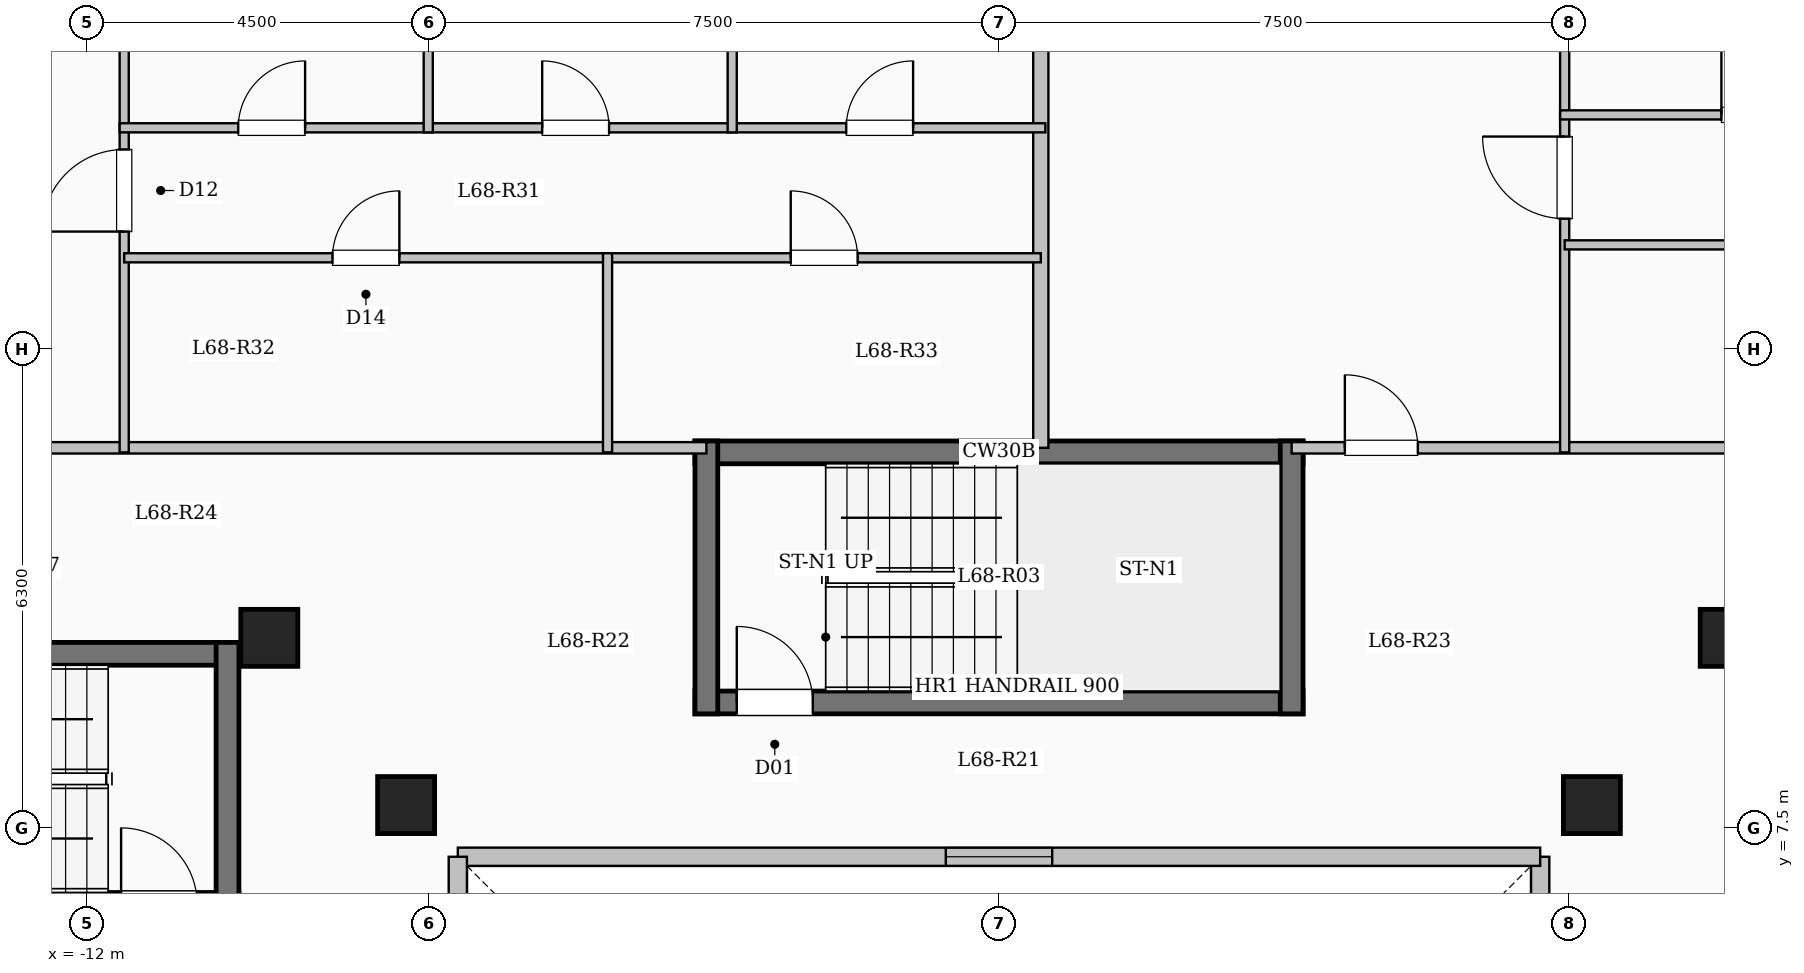
"""IFC4 building model, lengths in metres.
Left out: names, types, materials, properties, quantities, classifications, styles, units other than length and angle.
Written with IfcOpenShell. Run it as: python <this file> out.ifc"""

import sys

from ifc_helpers import new_model, si_unit, direction, frame, frame_2d, origin, origin_2d, place, context, subcontext, project, spatial, rectangle, extrude, element, fill, save


model = new_model("IFC4")
c1 = context("Model", 3, precision=1e-05, world=origin(), true_north=direction((0.0, 1.0)))
c2 = subcontext(c1, "Body", "Model", "MODEL_VIEW")
j1 = project(units=[si_unit("LENGTHUNIT", "METRE"), si_unit("PLANEANGLEUNIT", "RADIAN")], contexts=[c1])
p1 = place(None, origin())
s1 = spatial("IfcSite", under=j1, at=p1, CompositionType="ELEMENT")
p2 = place(p1, origin())
s2 = spatial("IfcBuilding", under=s1, at=p2, CompositionType="ELEMENT")
p3 = place(p2, frame((0.0, 0.0, 251.55)))
s3 = spatial("IfcBuildingStorey", under=s2, at=p3, CompositionType="ELEMENT", Elevation=251.55)
for number, where, z_axis, x_axis in (
    (1, (-7.8, 7.8, 0.0), (0.0, 0.0, 1.0), (1.0, 0.0, 0.0)),
    (2, (7.8, 7.8, 0.0), (0.0, 0.0, 1.0), (1.0, 0.0, 0.0)),
    (3, (-9.6, 10.0, 0.0), (0.0, 0.0, 1.0), (1.0, 0.0, 0.0)),
    (4, (9.6, 10.0, 0.0), (0.0, 0.0, 1.0), (1.0, 0.0, 0.0)),
):
    element("IfcColumn", number, at=place(p3, frame(where, z_axis=z_axis, x_axis=x_axis)), inside=s3, PredefinedType="COLUMN", context=c2, shape_type="SweptSolid", body=[
        extrude(rectangle(XDim=0.75, YDim=0.75, at=origin_2d()), origin(), (0.0, 0.0, 1.0), 3.35),
    ])
p4 = place(p3, frame((7.12, -7.12, 0.0), z_axis=(0.0, 0.0, 1.0), x_axis=(0.0, 1.0, 0.0)))
e5 = element("IfcWall", 5, at=p4, inside=s3, PredefinedType="SOLIDWALL", context=c2, shape_type="SweptSolid", body=[
    extrude(rectangle(XDim=14.24, YDim=0.24, at=frame_2d((7.12, 0.0))), origin(), (0.0, 0.0, 1.0), 3.1),
])
p5 = place(p4, frame((6.42, 0.0, 0.95)))
e6 = element("IfcOpeningElement", 6, at=p5, cuts=e5, PredefinedType="OPENING", context=c2, shape_type="SweptSolid", body=[
    extrude(rectangle(XDim=1.4, YDim=1.5, at=frame_2d((0.7, 0.75))), frame((0.0, 0.13, 0.0), z_axis=(0.0, -1.0, 0.0), x_axis=(1.0, 0.0, 0.0)), (0.0, 0.0, 1.0), 0.26),
])
p6 = place(p3, frame((7.12, 7.12, 0.0), z_axis=(0.0, 0.0, 1.0), x_axis=(-1.0, 0.0, 0.0)))
e7 = element("IfcWall", 7, at=p6, inside=s3, PredefinedType="SOLIDWALL", context=c2, shape_type="SweptSolid", body=[
    extrude(rectangle(XDim=14.24, YDim=0.24, at=frame_2d((7.12, 0.0))), origin(), (0.0, 0.0, 1.0), 3.1),
])
p7 = place(p6, frame((6.42, 0.0, 0.95)))
e8 = element("IfcOpeningElement", 8, at=p7, cuts=e7, PredefinedType="OPENING", context=c2, shape_type="SweptSolid", body=[
    extrude(rectangle(XDim=1.4, YDim=1.5, at=frame_2d((0.7, 0.75))), frame((0.0, 0.13, 0.0), z_axis=(0.0, -1.0, 0.0), x_axis=(1.0, 0.0, 0.0)), (0.0, 0.0, 1.0), 0.26),
])
p8 = place(p3, frame((-7.12, 7.12, 0.0), z_axis=(0.0, 0.0, 1.0), x_axis=(0.0, -1.0, 0.0)))
e9 = element("IfcWall", 9, at=p8, inside=s3, PredefinedType="SOLIDWALL", context=c2, shape_type="SweptSolid", body=[
    extrude(rectangle(XDim=14.24, YDim=0.24, at=frame_2d((7.12, 0.0))), origin(), (0.0, 0.0, 1.0), 3.1),
])
p9 = place(p8, frame((6.42, 0.0, 0.95)))
e10 = element("IfcOpeningElement", 10, at=p9, cuts=e9, PredefinedType="OPENING", context=c2, shape_type="SweptSolid", body=[
    extrude(rectangle(XDim=1.4, YDim=1.5, at=frame_2d((0.7, 0.75))), frame((0.0, 0.13, 0.0), z_axis=(0.0, -1.0, 0.0), x_axis=(1.0, 0.0, 0.0)), (0.0, 0.0, 1.0), 0.26),
])
p10 = place(p3, frame((-18.0, 9.79, 0.0), z_axis=(0.0, 0.0, 1.0), x_axis=(1.0, 0.0, 0.0)))
e11 = element("IfcWall", 11, at=p10, inside=s3, PredefinedType="SHEAR", context=c2, shape_type="SweptSolid", body=[
    extrude(rectangle(XDim=8.0, YDim=0.3, at=frame_2d((4.0, 0.0))), origin(), (0.0, 0.0, 1.0), 3.35),
])
p11 = place(p3, frame((-18.0, 6.5, 0.0), z_axis=(0.0, 0.0, 1.0), x_axis=(1.0, 0.0, 0.0)))
e12 = element("IfcWall", 12, at=p11, inside=s3, PredefinedType="SHEAR", context=c2, shape_type="SweptSolid", body=[
    extrude(rectangle(XDim=8.0, YDim=0.3, at=frame_2d((4.0, 0.0))), origin(), (0.0, 0.0, 1.0), 3.35),
])
p12 = place(p11, frame((6.45, 0.0, 0.0)))
e13 = element("IfcOpeningElement", 13, at=p12, cuts=e12, PredefinedType="OPENING", context=c2, shape_type="SweptSolid", body=[
    extrude(rectangle(XDim=1.0, YDim=2.15, at=frame_2d((0.5, 1.075))), frame((0.0, 0.16, 0.0), z_axis=(0.0, -1.0, 0.0), x_axis=(1.0, 0.0, 0.0)), (0.0, 0.0, 1.0), 0.32),
])
p13 = place(p3, frame((-10.15, 6.35, 0.0), z_axis=(0.0, 0.0, 1.0), x_axis=(0.0, 1.0, 0.0)))
e14 = element("IfcWall", 14, at=p13, inside=s3, PredefinedType="SHEAR", context=c2, shape_type="SweptSolid", body=[
    extrude(rectangle(XDim=3.59, YDim=0.3, at=frame_2d((1.795, 0.0))), origin(), (0.0, 0.0, 1.0), 3.35),
])
p14 = place(p3, frame((-4.0, 12.44, 0.0), z_axis=(0.0, 0.0, 1.0), x_axis=(1.0, 0.0, 0.0)))
e15 = element("IfcWall", 15, at=p14, inside=s3, PredefinedType="SHEAR", context=c2, shape_type="SweptSolid", body=[
    extrude(rectangle(XDim=8.0, YDim=0.3, at=frame_2d((4.0, 0.0))), origin(), (0.0, 0.0, 1.0), 3.35),
])
p15 = place(p3, frame((-4.0, 9.15, 0.0), z_axis=(0.0, 0.0, 1.0), x_axis=(1.0, 0.0, 0.0)))
e16 = element("IfcWall", 16, at=p15, inside=s3, PredefinedType="SHEAR", context=c2, shape_type="SweptSolid", body=[
    extrude(rectangle(XDim=8.0, YDim=0.3, at=frame_2d((4.0, 0.0))), origin(), (0.0, 0.0, 1.0), 3.35),
])
p16 = place(p15, frame((0.55, 0.0, 0.0)))
e17 = element("IfcOpeningElement", 17, at=p16, cuts=e16, PredefinedType="OPENING", context=c2, shape_type="SweptSolid", body=[
    extrude(rectangle(XDim=1.0, YDim=2.15, at=frame_2d((0.5, 1.075))), frame((0.0, 0.16, 0.0), z_axis=(0.0, -1.0, 0.0), x_axis=(1.0, 0.0, 0.0)), (0.0, 0.0, 1.0), 0.32),
])
for number, where, z_axis, x_axis in (
    (18, (-3.85, 9.0, 0.0), (0.0, 0.0, 1.0), (0.0, 1.0, 0.0)),
    (19, (3.85, 9.0, 0.0), (0.0, 0.0, 1.0), (0.0, 1.0, 0.0)),
):
    element("IfcWall", number, at=place(p3, frame(where, z_axis=z_axis, x_axis=x_axis)), inside=s3, PredefinedType="SHEAR", context=c2, shape_type="SweptSolid", body=[
        extrude(rectangle(XDim=3.59, YDim=0.3, at=frame_2d((1.795, 0.0))), origin(), (0.0, 0.0, 1.0), 3.35),
    ])
p17 = place(p3, frame((-17.75, 12.5, 0.0), z_axis=(0.0, 0.0, 1.0), x_axis=(1.0, 0.0, 0.0)))
e20 = element("IfcWall", 20, at=p17, inside=s3, PredefinedType="PARTITIONING", context=c2, shape_type="SweptSolid", body=[
    extrude(rectangle(XDim=13.9, YDim=0.15, at=frame_2d((6.95, 0.0))), origin(), (0.0, 0.0, 1.0), 3.1),
])
p18 = place(p17, frame((0.7, 0.0, 0.0)))
e21 = element("IfcOpeningElement", 21, at=p18, cuts=e20, PredefinedType="OPENING", context=c2, shape_type="SweptSolid", body=[
    extrude(rectangle(XDim=0.96, YDim=2.15, at=frame_2d((0.48, 1.075))), frame((0.0, 0.085, 0.0), z_axis=(0.0, -1.0, 0.0), x_axis=(1.0, 0.0, 0.0)), (0.0, 0.0, 1.0), 0.17),
])
p19 = place(p3, frame((3.85, 12.5, 0.0), z_axis=(0.0, 0.0, 1.0), x_axis=(1.0, 0.0, 0.0)))
e22 = element("IfcWall", 22, at=p19, inside=s3, PredefinedType="PARTITIONING", context=c2, shape_type="SweptSolid", body=[
    extrude(rectangle(XDim=13.9, YDim=0.15, at=frame_2d((6.95, 0.0))), origin(), (0.0, 0.0, 1.0), 3.1),
])
p20 = place(p19, frame((0.7, 0.0, 0.0)))
e23 = element("IfcOpeningElement", 23, at=p20, cuts=e22, PredefinedType="OPENING", context=c2, shape_type="SweptSolid", body=[
    extrude(rectangle(XDim=0.96, YDim=2.15, at=frame_2d((0.48, 1.075))), frame((0.0, 0.085, 0.0), z_axis=(0.0, -1.0, 0.0), x_axis=(1.0, 0.0, 0.0)), (0.0, 0.0, 1.0), 0.17),
])
p21 = place(p3, frame((0.55, 12.5, 0.0), z_axis=(0.0, 0.0, 1.0), x_axis=(0.0, 1.0, 0.0)))
e24 = element("IfcWall", 24, at=p21, inside=s3, PredefinedType="SOLIDWALL", context=c2, shape_type="SweptSolid", body=[
    extrude(rectangle(XDim=9.88, YDim=0.2, at=frame_2d((4.94, 0.0))), origin(), (0.0, 0.0, 1.0), 3.1),
])
p22 = place(p3, frame((-11.509, 12.44, 0.0), z_axis=(0.0, 0.0, 1.0), x_axis=(0.0, 1.0, 0.0)))
e25 = element("IfcWall", 25, at=p22, inside=s3, PredefinedType="PARTITIONING", context=c2, shape_type="SweptSolid", body=[
    extrude(rectangle(XDim=8.46, YDim=0.12, at=frame_2d((4.23, 0.0))), origin(), (0.0, 0.0, 1.0), 3.1),
])
p23 = place(p22, frame((2.905, 0.0, 0.0)))
e26 = element("IfcOpeningElement", 26, at=p23, cuts=e25, PredefinedType="OPENING", context=c2, shape_type="SweptSolid", body=[
    extrude(rectangle(XDim=1.08, YDim=2.15, at=frame_2d((0.54, 1.075))), frame((0.0, 0.07, 0.0), z_axis=(0.0, -1.0, 0.0), x_axis=(1.0, 0.0, 0.0)), (0.0, 0.0, 1.0), 0.14),
])
p24 = place(p3, frame((-11.509, 15.0, 0.0), z_axis=(0.0, 0.0, 1.0), x_axis=(1.0, 0.0, 0.0)))
e27 = element("IfcWall", 27, at=p24, inside=s3, PredefinedType="PARTITIONING", context=c2, shape_type="SweptSolid", body=[
    extrude(rectangle(XDim=6.359, YDim=0.12, at=frame_2d((3.18, 0.0))), origin(), (0.0, 0.0, 1.0), 3.1),
])
p25 = place(p24, frame((2.74, 0.0, 0.0)))
e28 = element("IfcOpeningElement", 28, at=p25, cuts=e27, PredefinedType="OPENING", context=c2, shape_type="SweptSolid", body=[
    extrude(rectangle(XDim=0.88, YDim=2.1, at=frame_2d((0.44, 1.05))), frame((0.0, 0.07, 0.0), z_axis=(0.0, -1.0, 0.0), x_axis=(1.0, 0.0, 0.0)), (0.0, 0.0, 1.0), 0.14),
])
p26 = place(p3, frame((-5.15, 15.0, 0.0), z_axis=(0.0, 0.0, 1.0), x_axis=(1.0, 0.0, 0.0)))
e29 = element("IfcWall", 29, at=p26, inside=s3, PredefinedType="PARTITIONING", context=c2, shape_type="SweptSolid", body=[
    extrude(rectangle(XDim=5.7, YDim=0.12, at=frame_2d((2.85, 0.0))), origin(), (0.0, 0.0, 1.0), 3.1),
])
p27 = place(p26, frame((2.41, 0.0, 0.0)))
e30 = element("IfcOpeningElement", 30, at=p27, cuts=e29, PredefinedType="OPENING", context=c2, shape_type="SweptSolid", body=[
    extrude(rectangle(XDim=0.88, YDim=2.1, at=frame_2d((0.44, 1.05))), frame((0.0, 0.07, 0.0), z_axis=(0.0, -1.0, 0.0), x_axis=(1.0, 0.0, 0.0)), (0.0, 0.0, 1.0), 0.14),
])
p28 = place(p3, frame((-11.569, 16.71, 0.0), z_axis=(0.0, 0.0, 1.0), x_axis=(1.0, 0.0, 0.0)))
e31 = element("IfcWall", 31, at=p28, inside=s3, PredefinedType="PARTITIONING", context=c2, shape_type="SweptSolid", body=[
    extrude(rectangle(XDim=12.179, YDim=0.12, at=frame_2d((6.09, 0.0))), origin(), (0.0, 0.0, 1.0), 2.785),
])
p29 = place(p28, frame((1.56, 0.0, 0.0)))
e32 = element("IfcOpeningElement", 32, at=p29, cuts=e31, PredefinedType="OPENING", context=c2, shape_type="SweptSolid", body=[
    extrude(rectangle(XDim=0.88, YDim=2.1, at=frame_2d((0.44, 1.05))), frame((0.0, 0.07, 0.0), z_axis=(0.0, -1.0, 0.0), x_axis=(1.0, 0.0, 0.0)), (0.0, 0.0, 1.0), 0.14),
])
p30 = place(p28, frame((5.559, 0.0, 0.0)))
e33 = element("IfcOpeningElement", 33, at=p30, cuts=e31, PredefinedType="OPENING", context=c2, shape_type="SweptSolid", body=[
    extrude(rectangle(XDim=0.88, YDim=2.1, at=frame_2d((0.44, 1.05))), frame((0.0, 0.07, 0.0), z_axis=(0.0, -1.0, 0.0), x_axis=(1.0, 0.0, 0.0)), (0.0, 0.0, 1.0), 0.14),
])
p31 = place(p28, frame((9.559, 0.0, 0.0)))
e34 = element("IfcOpeningElement", 34, at=p31, cuts=e31, PredefinedType="OPENING", context=c2, shape_type="SweptSolid", body=[
    extrude(rectangle(XDim=0.88, YDim=2.1, at=frame_2d((0.44, 1.05))), frame((0.0, 0.07, 0.0), z_axis=(0.0, -1.0, 0.0), x_axis=(1.0, 0.0, 0.0)), (0.0, 0.0, 1.0), 0.14),
])
p32 = place(p3, frame((-5.15, 12.44, 0.0), z_axis=(0.0, 0.0, 1.0), x_axis=(0.0, 1.0, 0.0)))
e35 = element("IfcWall", 35, at=p32, inside=s3, PredefinedType="PARTITIONING", context=c2, shape_type="SweptSolid", body=[
    extrude(rectangle(XDim=2.62, YDim=0.12, at=frame_2d((1.31, 0.0))), origin(), (0.0, 0.0, 1.0), 3.1),
])
p33 = place(p3, frame((-7.509, 16.65, 0.0), z_axis=(0.0, 0.0, 1.0), x_axis=(0.0, 1.0, 0.0)))
e36 = element("IfcWall", 36, at=p33, inside=s3, PredefinedType="PARTITIONING", context=c2, shape_type="SweptSolid", body=[
    extrude(rectangle(XDim=5.111, YDim=0.12, at=frame_2d((2.556, 0.0))), origin(), (0.0, 0.0, 1.0), 2.685),
])
p34 = place(p3, frame((-3.51, 16.65, 0.0), z_axis=(0.0, 0.0, 1.0), x_axis=(0.0, 1.0, 0.0)))
e37 = element("IfcWall", 37, at=p34, inside=s3, PredefinedType="PARTITIONING", context=c2, shape_type="SweptSolid", body=[
    extrude(rectangle(XDim=5.73, YDim=0.12, at=frame_2d((2.865, 0.0))), origin(), (0.0, 0.0, 1.0), 3.1),
])
p35 = place(p3, frame((7.442, 12.44, 0.0), z_axis=(0.0, 0.0, 1.0), x_axis=(0.0, 1.0, 0.0)))
e38 = element("IfcWall", 38, at=p35, inside=s3, PredefinedType="PARTITIONING", context=c2, shape_type="SweptSolid", body=[
    extrude(rectangle(XDim=9.338, YDim=0.12, at=frame_2d((4.669, 0.0))), origin(), (0.0, 0.0, 1.0), 2.685),
])
p36 = place(p35, frame((3.075, 0.0, 0.0)))
e39 = element("IfcOpeningElement", 39, at=p36, cuts=e38, PredefinedType="OPENING", context=c2, shape_type="SweptSolid", body=[
    extrude(rectangle(XDim=1.08, YDim=2.15, at=frame_2d((0.54, 1.075))), frame((0.0, 0.07, 0.0), z_axis=(0.0, -1.0, 0.0), x_axis=(1.0, 0.0, 0.0)), (0.0, 0.0, 1.0), 0.14),
])
p37 = place(p3, frame((7.442, 15.17, 0.0), z_axis=(0.0, 0.0, 1.0), x_axis=(1.0, 0.0, 0.0)))
e40 = element("IfcWall", 40, at=p37, inside=s3, PredefinedType="PARTITIONING", context=c2, shape_type="SweptSolid", body=[
    extrude(rectangle(XDim=5.841, YDim=0.12, at=frame_2d((2.92, 0.0))), origin(), (0.0, 0.0, 1.0), 3.1),
])
p38 = place(p37, frame((2.48, 0.0, 0.0)))
e41 = element("IfcOpeningElement", 41, at=p38, cuts=e40, PredefinedType="OPENING", context=c2, shape_type="SweptSolid", body=[
    extrude(rectangle(XDim=0.88, YDim=2.1, at=frame_2d((0.44, 1.05))), frame((0.0, 0.07, 0.0), z_axis=(0.0, -1.0, 0.0), x_axis=(1.0, 0.0, 0.0)), (0.0, 0.0, 1.0), 0.14),
])
p39 = place(p3, frame((7.382, 16.88, 0.0), z_axis=(0.0, 0.0, 1.0), x_axis=(1.0, 0.0, 0.0)))
e42 = element("IfcWall", 42, at=p39, inside=s3, PredefinedType="PARTITIONING", context=c2, shape_type="SweptSolid", body=[
    extrude(rectangle(XDim=10.428, YDim=0.12, at=frame_2d((5.214, 0.0))), origin(), (0.0, 0.0, 1.0), 2.785),
])
p40 = place(p39, frame((2.122, 0.0, 0.0)))
e43 = element("IfcOpeningElement", 43, at=p40, cuts=e42, PredefinedType="OPENING", context=c2, shape_type="SweptSolid", body=[
    extrude(rectangle(XDim=0.88, YDim=2.1, at=frame_2d((0.44, 1.05))), frame((0.0, 0.07, 0.0), z_axis=(0.0, -1.0, 0.0), x_axis=(1.0, 0.0, 0.0)), (0.0, 0.0, 1.0), 0.14),
])
p41 = place(p39, frame((7.246, 0.0, 0.0)))
e44 = element("IfcOpeningElement", 44, at=p41, cuts=e42, PredefinedType="OPENING", context=c2, shape_type="SweptSolid", body=[
    extrude(rectangle(XDim=0.88, YDim=2.1, at=frame_2d((0.44, 1.05))), frame((0.0, 0.07, 0.0), z_axis=(0.0, -1.0, 0.0), x_axis=(1.0, 0.0, 0.0)), (0.0, 0.0, 1.0), 0.14),
])
p42 = place(p7, origin())
e45 = element("IfcWindow", 45, at=p42, inside=s3, PartitioningType="SINGLE_PANEL", PredefinedType="WINDOW", context=c2, shape_type="SweptSolid", body=[
    extrude(rectangle(XDim=1.4, YDim=1.5, at=frame_2d((0.7, 0.75))), frame((0.0, 0.03, 0.0), z_axis=(0.0, -1.0, 0.0), x_axis=(1.0, 0.0, 0.0)), (0.0, 0.0, 1.0), 0.06),
])
fill(e8, e45)
p43 = place(p16, origin())
e46 = element("IfcDoor", 46, at=p43, inside=s3, OperationType="SINGLE_SWING_LEFT", PredefinedType="DOOR", context=c2, shape_type="SweptSolid", body=[
    extrude(rectangle(XDim=1.0, YDim=2.15, at=frame_2d((0.5, 1.075))), frame((0.0, 0.025, 0.0), z_axis=(0.0, -1.0, 0.0), x_axis=(1.0, 0.0, 0.0)), (0.0, 0.0, 1.0), 0.05),
])
fill(e17, e46)
p44 = place(p23, origin())
e47 = element("IfcDoor", 47, at=p44, inside=s3, OperationType="SINGLE_SWING_LEFT", PredefinedType="DOOR", context=c2, shape_type="SweptSolid", body=[
    extrude(rectangle(XDim=1.08, YDim=2.15, at=frame_2d((0.54, 1.075))), frame((0.0, 0.025, 0.0), z_axis=(0.0, -1.0, 0.0), x_axis=(1.0, 0.0, 0.0)), (0.0, 0.0, 1.0), 0.05),
])
fill(e26, e47)
p45 = place(p25, origin())
e48 = element("IfcDoor", 48, at=p45, inside=s3, OperationType="SINGLE_SWING_RIGHT", PredefinedType="DOOR", context=c2, shape_type="SweptSolid", body=[
    extrude(rectangle(XDim=0.88, YDim=2.1, at=frame_2d((0.44, 1.05))), frame((0.0, 0.025, 0.0), z_axis=(0.0, -1.0, 0.0), x_axis=(1.0, 0.0, 0.0)), (0.0, 0.0, 1.0), 0.05),
])
fill(e28, e48)
p46 = place(p27, origin())
e49 = element("IfcDoor", 49, at=p46, inside=s3, OperationType="SINGLE_SWING_LEFT", PredefinedType="DOOR", context=c2, shape_type="SweptSolid", body=[
    extrude(rectangle(XDim=0.88, YDim=2.1, at=frame_2d((0.44, 1.05))), frame((0.0, 0.025, 0.0), z_axis=(0.0, -1.0, 0.0), x_axis=(1.0, 0.0, 0.0)), (0.0, 0.0, 1.0), 0.05),
])
fill(e30, e49)
p47 = place(p29, origin())
e50 = element("IfcDoor", 50, at=p47, inside=s3, OperationType="SINGLE_SWING_RIGHT", PredefinedType="DOOR", context=c2, shape_type="SweptSolid", body=[
    extrude(rectangle(XDim=0.88, YDim=2.1, at=frame_2d((0.44, 1.05))), frame((0.0, 0.025, 0.0), z_axis=(0.0, -1.0, 0.0), x_axis=(1.0, 0.0, 0.0)), (0.0, 0.0, 1.0), 0.05),
])
fill(e32, e50)
p48 = place(p30, origin())
e51 = element("IfcDoor", 51, at=p48, inside=s3, OperationType="SINGLE_SWING_LEFT", PredefinedType="DOOR", context=c2, shape_type="SweptSolid", body=[
    extrude(rectangle(XDim=0.88, YDim=2.1, at=frame_2d((0.44, 1.05))), frame((0.0, 0.025, 0.0), z_axis=(0.0, -1.0, 0.0), x_axis=(1.0, 0.0, 0.0)), (0.0, 0.0, 1.0), 0.05),
])
fill(e33, e51)
p49 = place(p31, origin())
e52 = element("IfcDoor", 52, at=p49, inside=s3, OperationType="SINGLE_SWING_RIGHT", PredefinedType="DOOR", context=c2, shape_type="SweptSolid", body=[
    extrude(rectangle(XDim=0.88, YDim=2.1, at=frame_2d((0.44, 1.05))), frame((0.0, 0.025, 0.0), z_axis=(0.0, -1.0, 0.0), x_axis=(1.0, 0.0, 0.0)), (0.0, 0.0, 1.0), 0.05),
])
fill(e34, e52)
p50 = place(p20, origin())
e53 = element("IfcDoor", 53, at=p50, inside=s3, OperationType="SINGLE_SWING_LEFT", PredefinedType="DOOR", context=c2, shape_type="SweptSolid", body=[
    extrude(rectangle(XDim=0.96, YDim=2.15, at=frame_2d((0.48, 1.075))), frame((0.0, 0.025, 0.0), z_axis=(0.0, -1.0, 0.0), x_axis=(1.0, 0.0, 0.0)), (0.0, 0.0, 1.0), 0.05),
])
fill(e23, e53)
p51 = place(p36, origin())
e54 = element("IfcDoor", 54, at=p51, inside=s3, OperationType="SINGLE_SWING_RIGHT", PredefinedType="DOOR", context=c2, shape_type="SweptSolid", body=[
    extrude(rectangle(XDim=1.08, YDim=2.15, at=frame_2d((0.54, 1.075))), frame((0.0, 0.025, 0.0), z_axis=(0.0, -1.0, 0.0), x_axis=(1.0, 0.0, 0.0)), (0.0, 0.0, 1.0), 0.05),
])
fill(e39, e54)
p52 = place(p40, origin())
e55 = element("IfcDoor", 55, at=p52, inside=s3, OperationType="SINGLE_SWING_LEFT", PredefinedType="DOOR", context=c2, shape_type="SweptSolid", body=[
    extrude(rectangle(XDim=0.88, YDim=2.1, at=frame_2d((0.44, 1.05))), frame((0.0, 0.025, 0.0), z_axis=(0.0, -1.0, 0.0), x_axis=(1.0, 0.0, 0.0)), (0.0, 0.0, 1.0), 0.05),
])
fill(e43, e55)
save(model, sys.argv[1])
